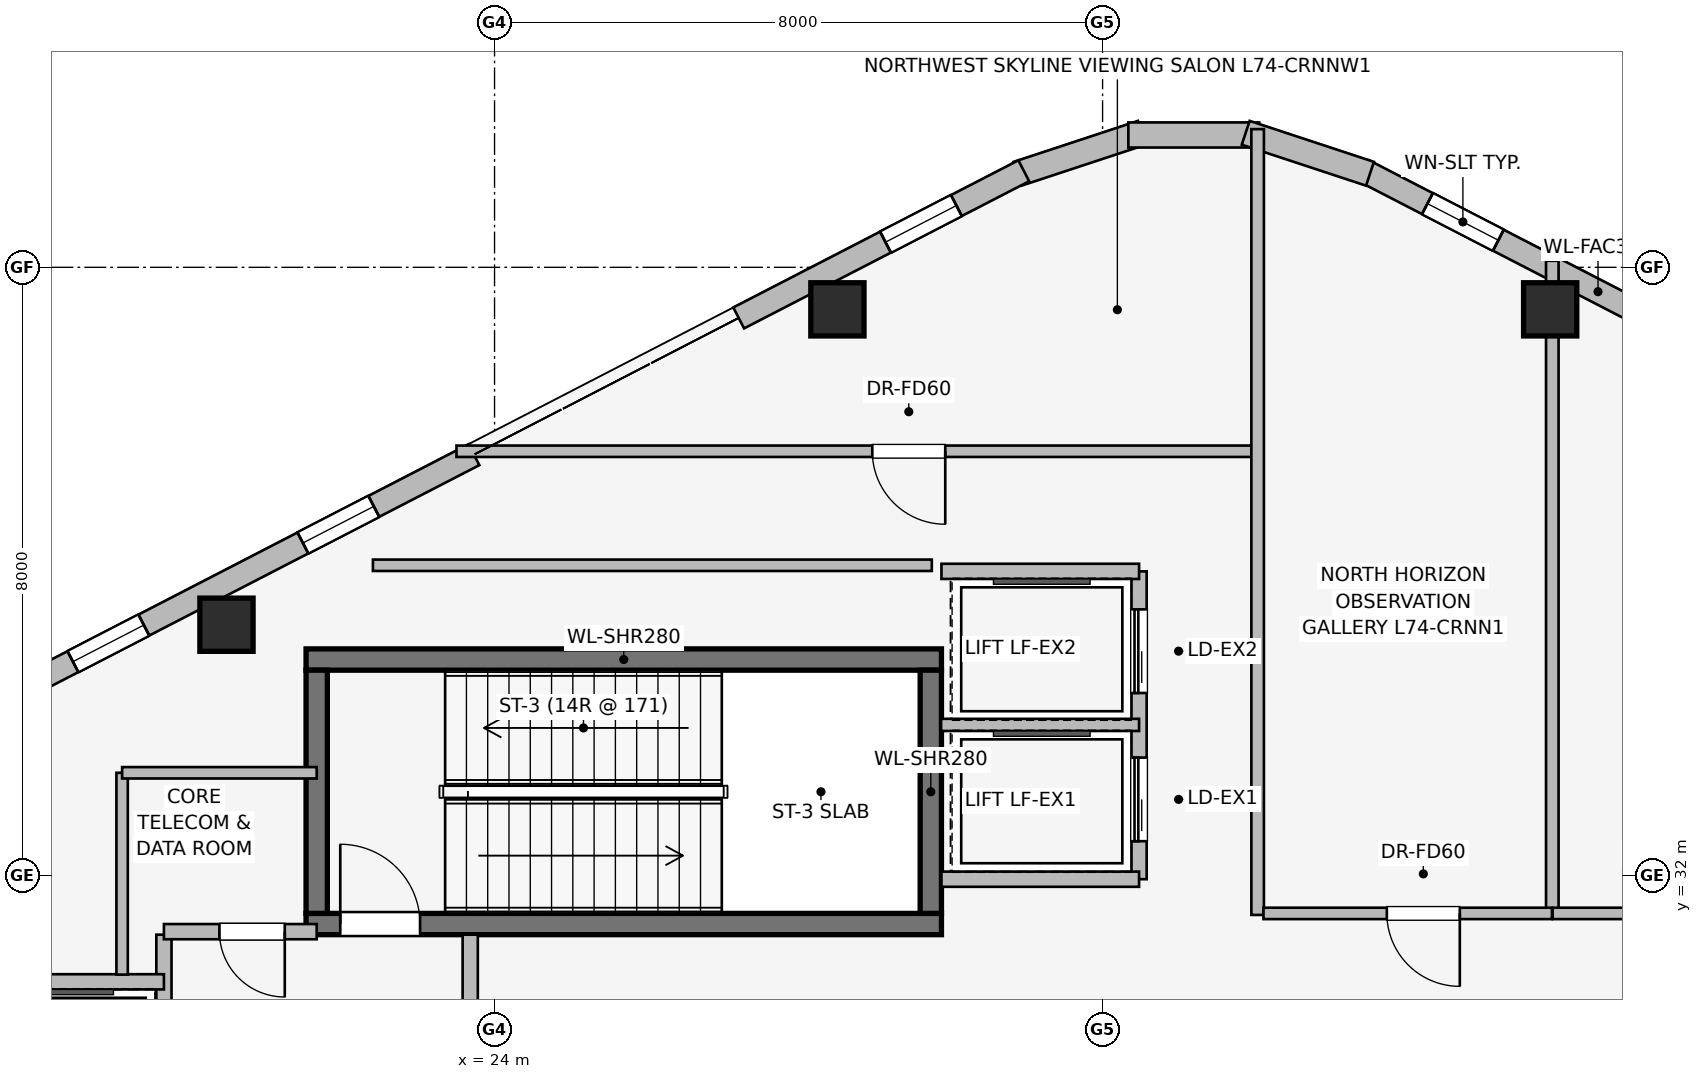
"""IFC4 building model, lengths in metres.
Left out: names, types, materials, properties, quantities, classifications, styles, units other than length and angle.
Written with IfcOpenShell. Run it as: python <this file> out.ifc"""

import sys

from ifc_helpers import new_model, si_unit, direction, frame, frame_2d, origin, origin_2d, place, context, subcontext, project, spatial, rectangle, extrude, element, fill, save


model = new_model("IFC4")
c1 = context("Model", 3, precision=1e-05, world=origin(), true_north=direction((0.0, 1.0)))
c2 = subcontext(c1, "Body", "Model", "MODEL_VIEW")
j1 = project(units=[si_unit("LENGTHUNIT", "METRE"), si_unit("PLANEANGLEUNIT", "RADIAN")], contexts=[c1])
p1 = place(None, origin())
s1 = spatial("IfcSite", under=j1, at=p1, CompositionType="ELEMENT")
p2 = place(p1, origin())
s2 = spatial("IfcBuilding", under=s1, at=p2, CompositionType="ELEMENT")
p3 = place(p2, frame((0.0, 0.0, 270.3)))
s3 = spatial("IfcBuildingStorey", under=s2, at=p3, CompositionType="ELEMENT", Elevation=270.3)
p4 = place(p3, frame((21.52, 31.36, 0.0), z_axis=(0.0, 0.0, 1.0), x_axis=(1.0, 0.0, 0.0)))
e1 = element("IfcWall", 1, at=p4, inside=s3, PredefinedType="SHEAR", context=c2, shape_type="SweptSolid", body=[
    extrude(rectangle(XDim=8.36, YDim=0.28, at=frame_2d((4.18, 0.0))), origin(), (0.0, 0.0, 1.0), 4.8),
])
p5 = place(p4, frame((0.45, 0.0, 0.0)))
e2 = element("IfcOpeningElement", 2, at=p5, cuts=e1, PredefinedType="OPENING", context=c2, shape_type="SweptSolid", body=[
    extrude(rectangle(XDim=1.05, YDim=2.0, at=frame_2d((0.525, 1.0))), frame((0.0, 0.15, 0.0), z_axis=(0.0, -1.0, 0.0), x_axis=(1.0, 0.0, 0.0)), (0.0, 0.0, 1.0), 0.3),
])
p6 = place(p3, frame((29.88, 34.84, 0.0), z_axis=(0.0, 0.0, 1.0), x_axis=(-1.0, 0.0, 0.0)))
e3 = element("IfcWall", 3, at=p6, inside=s3, PredefinedType="SHEAR", context=c2, shape_type="SweptSolid", body=[
    extrude(rectangle(XDim=8.36, YDim=0.28, at=frame_2d((4.18, 0.0))), origin(), (0.0, 0.0, 1.0), 4.8),
])
for number, where, z_axis, x_axis in (
    (4, (21.66, 34.7, 0.0), (0.0, 0.0, 1.0), (0.0, -1.0, 0.0)),
    (5, (29.74, 31.5, 0.0), (0.0, 0.0, 1.0), (0.0, 1.0, 0.0)),
):
    element("IfcWall", number, at=place(p3, frame(where, z_axis=z_axis, x_axis=x_axis)), inside=s3, PredefinedType="SHEAR", context=c2, shape_type="SweptSolid", body=[
        extrude(rectangle(XDim=3.2, YDim=0.28, at=frame_2d((1.6, 0.0))), origin(), (0.0, 0.0, 1.0), 4.8),
    ])
for number, where, z_axis, x_axis in (
    (6, (37.889, 39.447, 0.0), (0.0, 0.0, 1.0), (1.0, 0.0, 0.0)),
    (7, (28.511, 39.447, 0.0), (0.0, 0.0, 1.0), (1.0, 0.0, 0.0)),
    (8, (20.473, 35.298, 0.0), (0.0, 0.0, 1.0), (1.0, 0.0, 0.0)),
):
    element("IfcColumn", number, at=place(p3, frame(where, z_axis=z_axis, x_axis=x_axis)), inside=s3, PredefinedType="COLUMN", context=c2, shape_type="SweptSolid", body=[
        extrude(rectangle(XDim=0.7, YDim=0.7, at=origin_2d()), origin(), (0.0, 0.0, 1.0), 4.8),
    ])
p7 = place(p3, frame((35.437, 41.27, 0.0), z_axis=(0.0, 0.0, 1.0), x_axis=(0.888622971019, -0.458638436437, 0.0)))
e9 = element("IfcWall", 9, at=p7, inside=s3, PredefinedType="STANDARD", context=c2, shape_type="SweptSolid", body=[
    extrude(rectangle(XDim=6.936, YDim=0.31, at=frame_2d((3.468, 0.0))), origin(), (0.0, 0.0, 1.0), 4.49),
])
p8 = place(p7, frame((0.942, 0.0, 0.75)))
e10 = element("IfcOpeningElement", 10, at=p8, cuts=e9, PredefinedType="OPENING", context=c2, shape_type="SweptSolid", body=[
    extrude(rectangle(XDim=1.05, YDim=1.4, at=frame_2d((0.525, 0.7))), frame((0.0, 0.165, 0.0), z_axis=(0.0, -1.0, 0.0), x_axis=(1.0, 0.0, 0.0)), (0.0, 0.0, 1.0), 0.33),
])
p9 = place(p7, frame((4.435, 0.0, 0.75)))
e11 = element("IfcOpeningElement", 11, at=p9, cuts=e9, PredefinedType="OPENING", context=c2, shape_type="SweptSolid", body=[
    extrude(rectangle(XDim=1.05, YDim=1.4, at=frame_2d((0.525, 0.7))), frame((0.0, 0.165, 0.0), z_axis=(0.0, -1.0, 0.0), x_axis=(1.0, 0.0, 0.0)), (0.0, 0.0, 1.0), 0.33),
])
p10 = place(p3, frame((30.882, 41.231, 0.0), z_axis=(0.0, 0.0, 1.0), x_axis=(0.949713440491, 0.313120393699, 0.0)))
e12 = element("IfcWall", 12, at=p10, inside=s3, PredefinedType="STANDARD", context=c2, shape_type="SweptSolid", body=[
    extrude(rectangle(XDim=1.722, YDim=0.33, at=frame_2d((0.861, 0.0))), origin(), (0.0, 0.0, 1.0), 4.49),
])
p11 = place(p3, frame((32.339, 41.741, 0.0), z_axis=(0.0, 0.0, 1.0), x_axis=(1.0, 0.0, 0.0)))
e13 = element("IfcWall", 13, at=p11, inside=s3, PredefinedType="STANDARD", context=c2, shape_type="SweptSolid", body=[
    extrude(rectangle(XDim=1.722, YDim=0.33, at=frame_2d((0.861, 0.0))), origin(), (0.0, 0.0, 1.0), 4.49),
])
p12 = place(p3, frame((33.883, 41.77, 0.0), z_axis=(0.0, 0.0, 1.0), x_axis=(0.949713440491, -0.313120393699, 0.0)))
e14 = element("IfcWall", 14, at=p12, inside=s3, PredefinedType="STANDARD", context=c2, shape_type="SweptSolid", body=[
    extrude(rectangle(XDim=1.722, YDim=0.33, at=frame_2d((0.861, 0.0))), origin(), (0.0, 0.0, 1.0), 4.49),
])
p13 = place(p3, frame((17.566, 34.354, 0.0), z_axis=(0.0, 0.0, 1.0), x_axis=(0.888622971019, 0.458638436437, 0.0)))
e15 = element("IfcWall", 15, at=p13, inside=s3, PredefinedType="STANDARD", context=c2, shape_type="SweptSolid", body=[
    extrude(rectangle(XDim=6.936, YDim=0.31, at=frame_2d((3.468, 0.0))), origin(), (0.0, 0.0, 1.0), 4.49),
])
p14 = place(p13, frame((0.998, 0.0, 0.75)))
e16 = element("IfcOpeningElement", 16, at=p14, cuts=e15, PredefinedType="OPENING", context=c2, shape_type="SweptSolid", body=[
    extrude(rectangle(XDim=1.05, YDim=1.4, at=frame_2d((0.525, 0.7))), frame((0.0, 0.165, 0.0), z_axis=(0.0, -1.0, 0.0), x_axis=(1.0, 0.0, 0.0)), (0.0, 0.0, 1.0), 0.33),
])
p15 = place(p13, frame((4.403, 0.0, 0.75)))
e17 = element("IfcOpeningElement", 17, at=p15, cuts=e15, PredefinedType="OPENING", context=c2, shape_type="SweptSolid", body=[
    extrude(rectangle(XDim=1.05, YDim=1.4, at=frame_2d((0.525, 0.7))), frame((0.0, 0.165, 0.0), z_axis=(0.0, -1.0, 0.0), x_axis=(1.0, 0.0, 0.0)), (0.0, 0.0, 1.0), 0.33),
])
p16 = place(p3, frame((27.212, 39.334, 0.0), z_axis=(0.0, 0.0, 1.0), x_axis=(0.888616094641, 0.45865175934, 0.0)))
e18 = element("IfcWall", 18, at=p16, inside=s3, PredefinedType="STANDARD", context=c2, shape_type="SweptSolid", body=[
    extrude(rectangle(XDim=4.221, YDim=0.31, at=frame_2d((2.111, 0.0))), origin(), (0.0, 0.0, 1.0), 4.49),
])
p17 = place(p16, frame((2.174, 0.0, 0.75)))
e19 = element("IfcOpeningElement", 19, at=p17, cuts=e18, PredefinedType="OPENING", context=c2, shape_type="SweptSolid", body=[
    extrude(rectangle(XDim=1.05, YDim=1.4, at=frame_2d((0.525, 0.7))), frame((0.0, 0.165, 0.0), z_axis=(0.0, -1.0, 0.0), x_axis=(1.0, 0.0, 0.0)), (0.0, 0.0, 1.0), 0.33),
])
p18 = place(p3, frame((19.65, 25.68, 0.0), z_axis=(0.0, 0.0, 1.0), x_axis=(0.0, 1.0, 0.0)))
e20 = element("IfcWall", 20, at=p18, inside=s3, PredefinedType="PARTITIONING", context=c2, shape_type="SweptSolid", body=[
    extrude(rectangle(XDim=5.54, YDim=0.2, at=frame_2d((2.77, 0.0))), origin(), (0.0, 0.0, 1.0), 4.49),
])
p19 = place(p18, frame((0.62, 0.0, 0.0)))
e21 = element("IfcOpeningElement", 21, at=p19, cuts=e20, PredefinedType="OPENING", context=c2, shape_type="SweptSolid", body=[
    extrude(rectangle(XDim=1.1, YDim=2.2, at=frame_2d((0.55, 1.1))), frame((0.0, 0.11, 0.0), z_axis=(0.0, -1.0, 0.0), x_axis=(1.0, 0.0, 0.0)), (0.0, 0.0, 1.0), 0.22),
])
p20 = place(p18, frame((3.12, 0.0, 0.0)))
e22 = element("IfcOpeningElement", 22, at=p20, cuts=e20, PredefinedType="OPENING", context=c2, shape_type="SweptSolid", body=[
    extrude(rectangle(XDim=1.1, YDim=2.2, at=frame_2d((0.55, 1.1))), frame((0.0, 0.11, 0.0), z_axis=(0.0, -1.0, 0.0), x_axis=(1.0, 0.0, 0.0)), (0.0, 0.0, 1.0), 0.22),
])
p21 = place(p3, frame((23.68, 25.68, 0.0), z_axis=(0.0, 0.0, 1.0), x_axis=(0.0, 1.0, 0.0)))
e23 = element("IfcWall", 23, at=p21, inside=s3, PredefinedType="PARTITIONING", context=c2, shape_type="SweptSolid", body=[
    extrude(rectangle(XDim=5.54, YDim=0.2, at=frame_2d((2.77, 0.0))), origin(), (0.0, 0.0, 1.0), 4.49),
])
p22 = place(p21, frame((1.8, 0.0, 0.0)))
e24 = element("IfcOpeningElement", 24, at=p22, cuts=e23, PredefinedType="OPENING", context=c2, shape_type="SweptSolid", body=[
    extrude(rectangle(XDim=1.05, YDim=2.0, at=frame_2d((0.525, 1.0))), frame((0.0, 0.11, 0.0), z_axis=(0.0, -1.0, 0.0), x_axis=(1.0, 0.0, 0.0)), (0.0, 0.0, 1.0), 0.22),
])
p23 = place(p3, frame((21.66, 31.26, 0.0), z_axis=(0.0, 0.0, 1.0), x_axis=(-1.0, 0.0, 0.0)))
e25 = element("IfcWall", 25, at=p23, inside=s3, PredefinedType="PARTITIONING", context=c2, shape_type="SweptSolid", body=[
    extrude(rectangle(XDim=2.01, YDim=0.2, at=frame_2d((1.005, 0.0))), origin(), (0.0, 0.0, 1.0), 4.49),
])
p24 = place(p23, frame((0.42, 0.0, 0.0)))
e26 = element("IfcOpeningElement", 26, at=p24, cuts=e25, PredefinedType="OPENING", context=c2, shape_type="SweptSolid", body=[
    extrude(rectangle(XDim=0.86, YDim=2.0, at=frame_2d((0.43, 1.0))), frame((0.0, 0.11, 0.0), z_axis=(0.0, -1.0, 0.0), x_axis=(1.0, 0.0, 0.0)), (0.0, 0.0, 1.0), 0.22),
])
p25 = place(p3, frame((19.65, 30.6, 0.0), z_axis=(0.0, 0.0, 1.0), x_axis=(-1.0, 0.0, 0.0)))
e27 = element("IfcWall", 27, at=p25, inside=s3, PredefinedType="PARTITIONING", context=c2, shape_type="SweptSolid", body=[
    extrude(rectangle(XDim=2.5, YDim=0.2, at=frame_2d((1.25, 0.0))), origin(), (0.0, 0.0, 1.0), 3.39),
])
p26 = place(p3, frame((32.48, 31.95, 0.0), z_axis=(0.0, 0.0, 1.0), x_axis=(0.0, 1.0, 0.0)))
e28 = element("IfcWall", 28, at=p26, inside=s3, PredefinedType="PARTITIONING", context=c2, shape_type="SweptSolid", body=[
    extrude(rectangle(XDim=4.05, YDim=0.2, at=frame_2d((2.025, 0.0))), origin(), (0.0, 0.0, 1.0), 4.49),
])
p27 = place(p26, frame((0.5, 0.0, 0.0)))
e29 = element("IfcOpeningElement", 29, at=p27, cuts=e28, PredefinedType="OPENING", context=c2, shape_type="SweptSolid", body=[
    extrude(rectangle(XDim=1.1, YDim=2.2, at=frame_2d((0.55, 1.1))), frame((0.0, 0.11, 0.0), z_axis=(0.0, -1.0, 0.0), x_axis=(1.0, 0.0, 0.0)), (0.0, 0.0, 1.0), 0.22),
])
p28 = place(p26, frame((2.45, 0.0, 0.0)))
e30 = element("IfcOpeningElement", 30, at=p28, cuts=e28, PredefinedType="OPENING", context=c2, shape_type="SweptSolid", body=[
    extrude(rectangle(XDim=1.1, YDim=2.2, at=frame_2d((0.55, 1.1))), frame((0.0, 0.11, 0.0), z_axis=(0.0, -1.0, 0.0), x_axis=(1.0, 0.0, 0.0)), (0.0, 0.0, 1.0), 0.22),
])
p29 = place(p3, frame((29.88, 36.0, 0.0), z_axis=(0.0, 0.0, 1.0), x_axis=(1.0, 0.0, 0.0)))
e31 = element("IfcWall", 31, at=p29, inside=s3, PredefinedType="PARTITIONING", context=c2, shape_type="SweptSolid", body=[
    extrude(rectangle(XDim=2.6, YDim=0.2, at=frame_2d((1.3, 0.0))), origin(), (0.0, 0.0, 1.0), 4.49),
])
p30 = place(p3, frame((32.48, 31.95, 0.0), z_axis=(0.0, 0.0, 1.0), x_axis=(-1.0, 0.0, 0.0)))
e32 = element("IfcWall", 32, at=p30, inside=s3, PredefinedType="PARTITIONING", context=c2, shape_type="SweptSolid", body=[
    extrude(rectangle(XDim=2.6, YDim=0.2, at=frame_2d((1.3, 0.0))), origin(), (0.0, 0.0, 1.0), 3.882),
])
p31 = place(p3, frame((29.875, 33.98, 0.0), z_axis=(0.0, 0.0, 1.0), x_axis=(1.0, 0.0, 0.0)))
e33 = element("IfcWall", 33, at=p31, inside=s3, PredefinedType="PARTITIONING", context=c2, shape_type="SweptSolid", body=[
    extrude(rectangle(XDim=2.605, YDim=0.16, at=frame_2d((1.302, 0.0))), origin(), (0.0, 0.0, 1.0), 4.49),
])
p32 = place(p3, frame((19.1, 33.35, 0.0), z_axis=(0.0, 0.0, 1.0), x_axis=(0.0, -1.0, 0.0)))
e34 = element("IfcWall", 34, at=p32, inside=s3, PredefinedType="PARTITIONING", context=c2, shape_type="SweptSolid", body=[
    extrude(rectangle(XDim=2.655, YDim=0.15, at=frame_2d((1.328, 0.0))), origin(), (0.0, 0.0, 1.0), 4.49),
])
p33 = place(p3, frame((21.66, 33.35, 0.0), z_axis=(0.0, 0.0, 1.0), x_axis=(-1.0, 0.0, 0.0)))
e35 = element("IfcWall", 35, at=p33, inside=s3, PredefinedType="PARTITIONING", context=c2, shape_type="SweptSolid", body=[
    extrude(rectangle(XDim=2.56, YDim=0.15, at=frame_2d((1.28, 0.0))), origin(), (0.0, 0.0, 1.0), 4.49),
])
p34 = place(p3, frame((34.0, 37.58, 0.0), z_axis=(0.0, 0.0, 1.0), x_axis=(-1.0, 0.0, 0.0)))
e36 = element("IfcWall", 36, at=p34, inside=s3, PredefinedType="PARTITIONING", context=c2, shape_type="SweptSolid", body=[
    extrude(rectangle(XDim=10.501, YDim=0.15, at=frame_2d((5.25, 0.0))), origin(), (0.0, 0.0, 1.0), 4.49),
])
p35 = place(p34, frame((4.07, 0.0, 0.0)))
e37 = element("IfcOpeningElement", 37, at=p35, cuts=e36, PredefinedType="OPENING", context=c2, shape_type="SweptSolid", body=[
    extrude(rectangle(XDim=0.96, YDim=2.0, at=frame_2d((0.48, 1.0))), frame((0.0, 0.085, 0.0), z_axis=(0.0, -1.0, 0.0), x_axis=(1.0, 0.0, 0.0)), (0.0, 0.0, 1.0), 0.17),
])
p36 = place(p3, frame((34.04, 31.48, 0.0), z_axis=(0.0, 0.0, 1.0), x_axis=(0.0, 1.0, 0.0)))
e38 = element("IfcWall", 38, at=p36, inside=s3, PredefinedType="PARTITIONING", context=c2, shape_type="SweptSolid", body=[
    extrude(rectangle(XDim=10.338, YDim=0.165, at=frame_2d((5.169, 0.0))), origin(), (0.0, 0.0, 1.0), 4.49),
])
p37 = place(p3, frame((37.917, 31.51, 0.0), z_axis=(0.0, 0.0, 1.0), x_axis=(0.0, 1.0, 0.0)))
e39 = element("IfcWall", 39, at=p37, inside=s3, PredefinedType="PARTITIONING", context=c2, shape_type="SweptSolid", body=[
    extrude(rectangle(XDim=8.576, YDim=0.165, at=frame_2d((4.288, 0.0))), origin(), (0.0, 0.0, 1.0), 3.879),
])
p38 = place(p3, frame((37.912, 31.5, 0.0), z_axis=(0.0, 0.0, 1.0), x_axis=(-1.0, 0.0, 0.0)))
e40 = element("IfcWall", 40, at=p38, inside=s3, PredefinedType="PARTITIONING", context=c2, shape_type="SweptSolid", body=[
    extrude(rectangle(XDim=3.795, YDim=0.15, at=frame_2d((1.897, 0.0))), origin(), (0.0, 0.0, 1.0), 4.49),
])
p39 = place(p38, frame((1.212, 0.0, 0.0)))
e41 = element("IfcOpeningElement", 41, at=p39, cuts=e40, PredefinedType="OPENING", context=c2, shape_type="SweptSolid", body=[
    extrude(rectangle(XDim=0.96, YDim=2.0, at=frame_2d((0.48, 1.0))), frame((0.0, 0.085, 0.0), z_axis=(0.0, -1.0, 0.0), x_axis=(1.0, 0.0, 0.0)), (0.0, 0.0, 1.0), 0.17),
])
p40 = place(p3, frame((41.38, 31.5, 0.0), z_axis=(0.0, 0.0, 1.0), x_axis=(-1.0, 0.0, 0.0)))
e42 = element("IfcWall", 42, at=p40, inside=s3, PredefinedType="PARTITIONING", context=c2, shape_type="SweptSolid", body=[
    extrude(rectangle(XDim=3.458, YDim=0.15, at=frame_2d((1.729, 0.0))), origin(), (0.0, 0.0, 1.0), 4.49),
])
p41 = place(p40, frame((1.484, 0.0, 0.0)))
e43 = element("IfcOpeningElement", 43, at=p41, cuts=e42, PredefinedType="OPENING", context=c2, shape_type="SweptSolid", body=[
    extrude(rectangle(XDim=0.96, YDim=2.0, at=frame_2d((0.48, 1.0))), frame((0.0, 0.085, 0.0), z_axis=(0.0, -1.0, 0.0), x_axis=(1.0, 0.0, 0.0)), (0.0, 0.0, 1.0), 0.17),
])
p42 = place(p3, frame((29.753, 36.08, 0.0), z_axis=(0.0, 0.0, 1.0), x_axis=(-1.0, 0.0, 0.0)))
e44 = element("IfcWall", 44, at=p42, inside=s3, PredefinedType="PARTITIONING", context=c2, shape_type="SweptSolid", body=[
    extrude(rectangle(XDim=7.353, YDim=0.15, at=frame_2d((3.677, 0.0))), origin(), (0.0, 0.0, 1.0), 4.49),
])
p43 = place(p8, origin())
e45 = element("IfcWindow", 45, at=p43, inside=s3, PartitioningType="SINGLE_PANEL", PredefinedType="WINDOW", context=c2, shape_type="SweptSolid", body=[
    extrude(rectangle(XDim=1.05, YDim=1.4, at=frame_2d((0.525, 0.7))), frame((0.0, 0.03, 0.0), z_axis=(0.0, -1.0, 0.0), x_axis=(1.0, 0.0, 0.0)), (0.0, 0.0, 1.0), 0.06),
])
fill(e10, e45)
p44 = place(p14, origin())
e46 = element("IfcWindow", 46, at=p44, inside=s3, PartitioningType="SINGLE_PANEL", PredefinedType="WINDOW", context=c2, shape_type="SweptSolid", body=[
    extrude(rectangle(XDim=1.05, YDim=1.4, at=frame_2d((0.525, 0.7))), frame((0.0, 0.03, 0.0), z_axis=(0.0, -1.0, 0.0), x_axis=(1.0, 0.0, 0.0)), (0.0, 0.0, 1.0), 0.06),
])
fill(e16, e46)
p45 = place(p15, origin())
e47 = element("IfcWindow", 47, at=p45, inside=s3, PartitioningType="SINGLE_PANEL", PredefinedType="WINDOW", context=c2, shape_type="SweptSolid", body=[
    extrude(rectangle(XDim=1.05, YDim=1.4, at=frame_2d((0.525, 0.7))), frame((0.0, 0.03, 0.0), z_axis=(0.0, -1.0, 0.0), x_axis=(1.0, 0.0, 0.0)), (0.0, 0.0, 1.0), 0.06),
])
fill(e17, e47)
p46 = place(p17, origin())
e48 = element("IfcWindow", 48, at=p46, inside=s3, PartitioningType="SINGLE_PANEL", PredefinedType="WINDOW", context=c2, shape_type="SweptSolid", body=[
    extrude(rectangle(XDim=1.05, YDim=1.4, at=frame_2d((0.525, 0.7))), frame((0.0, 0.03, 0.0), z_axis=(0.0, -1.0, 0.0), x_axis=(1.0, 0.0, 0.0)), (0.0, 0.0, 1.0), 0.06),
])
fill(e19, e48)
p47 = place(p5, origin())
e49 = element("IfcDoor", 49, at=p47, inside=s3, OperationType="SINGLE_SWING_LEFT", PredefinedType="DOOR", context=c2, shape_type="SweptSolid", body=[
    extrude(rectangle(XDim=1.05, YDim=2.0, at=frame_2d((0.525, 1.0))), frame((0.0, 0.025, 0.0), z_axis=(0.0, -1.0, 0.0), x_axis=(1.0, 0.0, 0.0)), (0.0, 0.0, 1.0), 0.05),
])
fill(e2, e49)
p48 = place(p24, origin())
e50 = element("IfcDoor", 50, at=p48, inside=s3, OperationType="SINGLE_SWING_LEFT", PredefinedType="DOOR", context=c2, shape_type="SweptSolid", body=[
    extrude(rectangle(XDim=0.86, YDim=2.0, at=frame_2d((0.43, 1.0))), frame((0.0, 0.025, 0.0), z_axis=(0.0, -1.0, 0.0), x_axis=(1.0, 0.0, 0.0)), (0.0, 0.0, 1.0), 0.05),
])
fill(e26, e50)
p49 = place(p27, origin())
e51 = element("IfcDoor", 51, at=p49, inside=s3, OperationType="SLIDING_TO_LEFT", PredefinedType="DOOR", context=c2, shape_type="SweptSolid", body=[
    extrude(rectangle(XDim=1.1, YDim=2.2, at=frame_2d((0.55, 1.1))), frame((0.0, 0.025, 0.0), z_axis=(0.0, -1.0, 0.0), x_axis=(1.0, 0.0, 0.0)), (0.0, 0.0, 1.0), 0.05),
])
fill(e29, e51)
p50 = place(p28, origin())
e52 = element("IfcDoor", 52, at=p50, inside=s3, OperationType="SLIDING_TO_LEFT", PredefinedType="DOOR", context=c2, shape_type="SweptSolid", body=[
    extrude(rectangle(XDim=1.1, YDim=2.2, at=frame_2d((0.55, 1.1))), frame((0.0, 0.025, 0.0), z_axis=(0.0, -1.0, 0.0), x_axis=(1.0, 0.0, 0.0)), (0.0, 0.0, 1.0), 0.05),
])
fill(e30, e52)
p51 = place(p35, origin())
e53 = element("IfcDoor", 53, at=p51, inside=s3, OperationType="SINGLE_SWING_LEFT", PredefinedType="DOOR", context=c2, shape_type="SweptSolid", body=[
    extrude(rectangle(XDim=0.96, YDim=2.0, at=frame_2d((0.48, 1.0))), frame((0.0, 0.025, 0.0), z_axis=(0.0, -1.0, 0.0), x_axis=(1.0, 0.0, 0.0)), (0.0, 0.0, 1.0), 0.05),
])
fill(e37, e53)
p52 = place(p39, origin())
e54 = element("IfcDoor", 54, at=p52, inside=s3, OperationType="SINGLE_SWING_LEFT", PredefinedType="DOOR", context=c2, shape_type="SweptSolid", body=[
    extrude(rectangle(XDim=0.96, YDim=2.0, at=frame_2d((0.48, 1.0))), frame((0.0, 0.025, 0.0), z_axis=(0.0, -1.0, 0.0), x_axis=(1.0, 0.0, 0.0)), (0.0, 0.0, 1.0), 0.05),
])
fill(e41, e54)
save(model, sys.argv[1])
